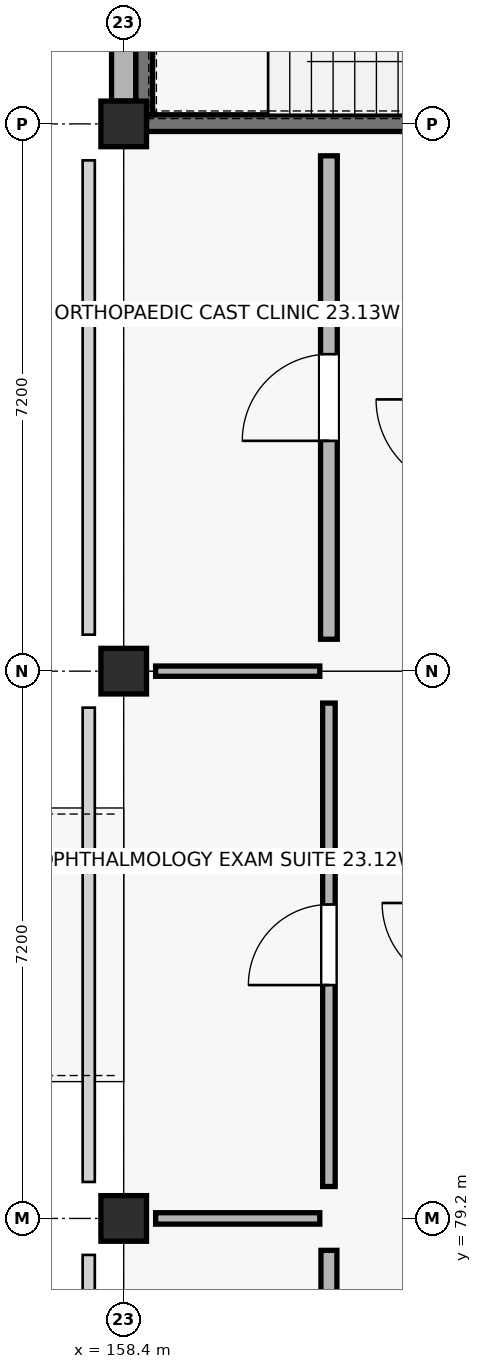
"""IFC4 building model, lengths in metres.
Left out: names, types, materials, properties, quantities, classifications, styles, units other than length and angle.
Written with IfcOpenShell. Run it as: python <this file> out.ifc"""

import sys

from ifc_helpers import new_model, si_unit, direction, frame, frame_2d, origin, origin_2d, place, context, subcontext, project, spatial, rectangle, extrude, element, fill, save


model = new_model("IFC4")
c1 = context("Model", 3, precision=1e-05, world=origin(), true_north=direction((0.0, 1.0)))
c2 = subcontext(c1, "Body", "Model", "MODEL_VIEW")
j1 = project(units=[si_unit("LENGTHUNIT", "METRE"), si_unit("PLANEANGLEUNIT", "RADIAN")], contexts=[c1])
p1 = place(None, origin())
s1 = spatial("IfcSite", under=j1, at=p1, CompositionType="ELEMENT")
p2 = place(p1, origin())
s2 = spatial("IfcBuilding", under=s1, at=p2, CompositionType="ELEMENT")
p3 = place(p2, frame((0.0, 0.0, 9.0)))
s3 = spatial("IfcBuildingStorey", under=s2, at=p3, CompositionType="ELEMENT", Elevation=9.0)
for number, where, z_axis, x_axis in (
    (1, (158.4, 79.2, 0.0), (0.0, 0.0, 1.0), (1.0, 0.0, 0.0)),
    (2, (158.4, 86.4, 0.0), (0.0, 0.0, 1.0), (1.0, 0.0, 0.0)),
    (3, (158.4, 93.6, 0.0), (0.0, 0.0, 1.0), (1.0, 0.0, 0.0)),
):
    element("IfcColumn", number, at=place(p3, frame(where, z_axis=z_axis, x_axis=x_axis)), inside=s3, PredefinedType="COLUMN", context=c2, shape_type="SweptSolid", body=[
        extrude(rectangle(XDim=0.6, YDim=0.6, at=origin_2d()), origin(), (0.0, 0.0, 1.0), 4.5),
    ])
p4 = place(p3, frame((158.4, 100.5, 0.0), z_axis=(0.0, 0.0, 1.0), x_axis=(0.0, -1.0, 0.0)))
e4 = element("IfcWall", 4, at=p4, inside=s3, PredefinedType="STANDARD", context=c2, shape_type="SweptSolid", body=[
    extrude(rectangle(XDim=6.6, YDim=0.32, at=frame_2d((3.3, 0.0))), origin(), (0.0, 0.0, 1.0), 3.69),
])
p5 = place(p3, frame((158.56, 93.61, 0.0), z_axis=(0.0, 0.0, 1.0), x_axis=(1.0, 0.0, 0.0)))
e5 = element("IfcWall", 5, at=p5, inside=s3, PredefinedType="SHEAR", context=c2, shape_type="SweptSolid", body=[
    extrude(rectangle(XDim=6.88, YDim=0.22, at=frame_2d((3.44, 0.0))), origin(), (0.0, 0.0, 1.0), 4.24),
])
p6 = place(p5, frame((5.3, 0.0, 0.0)))
e6 = element("IfcOpeningElement", 6, at=p6, cuts=e5, PredefinedType="OPENING", context=c2, shape_type="SweptSolid", body=[
    extrude(rectangle(XDim=1.15, YDim=2.15, at=frame_2d((0.575, 1.075))), frame((0.0, 0.12, 0.0), z_axis=(0.0, -1.0, 0.0), x_axis=(1.0, 0.0, 0.0)), (0.0, 0.0, 1.0), 0.24),
])
p7 = place(p3, frame((158.67, 93.72, 0.0), z_axis=(0.0, 0.0, 1.0), x_axis=(0.0, 1.0, 0.0)))
e7 = element("IfcWall", 7, at=p7, inside=s3, PredefinedType="SHEAR", context=c2, shape_type="SweptSolid", body=[
    extrude(rectangle(XDim=3.0, YDim=0.22, at=frame_2d((1.5, 0.0))), origin(), (0.0, 0.0, 1.0), 4.24),
])
p8 = place(p3, frame((161.1, 72.42, 0.0), z_axis=(0.0, 0.0, 1.0), x_axis=(0.0, 1.0, 0.0)))
e8 = element("IfcWall", 8, at=p8, inside=s3, PredefinedType="PLUMBINGWALL", context=c2, shape_type="SweptSolid", body=[
    extrude(rectangle(XDim=6.36, YDim=0.21, at=frame_2d((3.18, 0.0))), origin(), (0.0, 0.0, 1.0), 3.38),
])
p9 = place(p8, frame((2.69, 0.0, 0.0)))
e9 = element("IfcOpeningElement", 9, at=p9, cuts=e8, PredefinedType="OPENING", context=c2, shape_type="SweptSolid", body=[
    extrude(rectangle(XDim=0.98, YDim=2.04, at=frame_2d((0.49, 1.02))), frame((0.0, 0.115, 0.0), z_axis=(0.0, -1.0, 0.0), x_axis=(1.0, 0.0, 0.0)), (0.0, 0.0, 1.0), 0.23),
])
p10 = place(p3, frame((158.82, 79.2, 0.0), z_axis=(0.0, 0.0, 1.0), x_axis=(1.0, 0.0, 0.0)))
e10 = element("IfcWall", 10, at=p10, inside=s3, PredefinedType="PARTITIONING", context=c2, shape_type="SweptSolid", body=[
    extrude(rectangle(XDim=2.16, YDim=0.15, at=frame_2d((1.08, 0.0))), origin(), (0.0, 0.0, 1.0), 3.38),
])
p11 = place(p3, frame((161.1, 79.62, 0.0), z_axis=(0.0, 0.0, 1.0), x_axis=(0.0, 1.0, 0.0)))
e11 = element("IfcWall", 11, at=p11, inside=s3, PredefinedType="PARTITIONING", context=c2, shape_type="SweptSolid", body=[
    extrude(rectangle(XDim=6.36, YDim=0.165, at=frame_2d((3.18, 0.0))), origin(), (0.0, 0.0, 1.0), 3.38),
])
p12 = place(p11, frame((2.65, 0.0, 0.0)))
e12 = element("IfcOpeningElement", 12, at=p12, cuts=e11, PredefinedType="OPENING", context=c2, shape_type="SweptSolid", body=[
    extrude(rectangle(XDim=1.06, YDim=2.04, at=frame_2d((0.53, 1.02))), frame((0.0, 0.093, 0.0), z_axis=(0.0, -1.0, 0.0), x_axis=(1.0, 0.0, 0.0)), (0.0, 0.0, 1.0), 0.185),
])
p13 = place(p3, frame((158.82, 86.4, 0.0), z_axis=(0.0, 0.0, 1.0), x_axis=(1.0, 0.0, 0.0)))
e13 = element("IfcWall", 13, at=p13, inside=s3, PredefinedType="PARTITIONING", context=c2, shape_type="SweptSolid", body=[
    extrude(rectangle(XDim=2.16, YDim=0.135, at=frame_2d((1.08, 0.0))), origin(), (0.0, 0.0, 1.0), 3.38),
])
p14 = place(p3, frame((161.1, 86.82, 0.0), z_axis=(0.0, 0.0, 1.0), x_axis=(0.0, 1.0, 0.0)))
e14 = element("IfcWall", 14, at=p14, inside=s3, PredefinedType="SOLIDWALL", context=c2, shape_type="SweptSolid", body=[
    extrude(rectangle(XDim=6.36, YDim=0.22, at=frame_2d((3.18, 0.0))), origin(), (0.0, 0.0, 1.0), 3.38),
])
p15 = place(p14, frame((2.61, 0.0, 0.0)))
e15 = element("IfcOpeningElement", 15, at=p15, cuts=e14, PredefinedType="OPENING", context=c2, shape_type="SweptSolid", body=[
    extrude(rectangle(XDim=1.14, YDim=2.04, at=frame_2d((0.57, 1.02))), frame((0.0, 0.12, 0.0), z_axis=(0.0, -1.0, 0.0), x_axis=(1.0, 0.0, 0.0)), (0.0, 0.0, 1.0), 0.24),
])
p16 = place(p12, origin())
e16 = element("IfcDoor", 16, at=p16, inside=s3, OperationType="SINGLE_SWING_LEFT", PredefinedType="DOOR", context=c2, shape_type="SweptSolid", body=[
    extrude(rectangle(XDim=1.06, YDim=2.04, at=frame_2d((0.53, 1.02))), frame((0.0, 0.025, 0.0), z_axis=(0.0, -1.0, 0.0), x_axis=(1.0, 0.0, 0.0)), (0.0, 0.0, 1.0), 0.05),
])
fill(e12, e16)
p17 = place(p15, origin())
e17 = element("IfcDoor", 17, at=p17, inside=s3, OperationType="SINGLE_SWING_LEFT", PredefinedType="DOOR", context=c2, shape_type="SweptSolid", body=[
    extrude(rectangle(XDim=1.14, YDim=2.04, at=frame_2d((0.57, 1.02))), frame((0.0, 0.025, 0.0), z_axis=(0.0, -1.0, 0.0), x_axis=(1.0, 0.0, 0.0)), (0.0, 0.0, 1.0), 0.05),
])
fill(e15, e17)
save(model, sys.argv[1])
